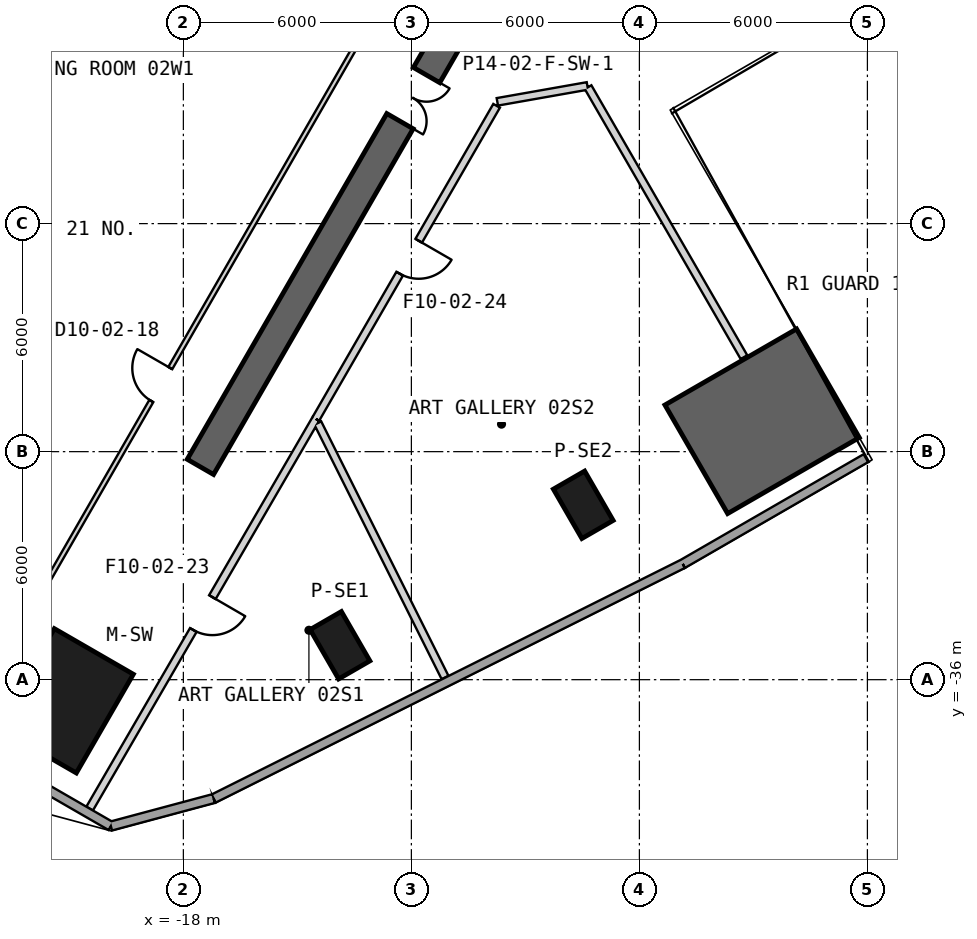
"""IFC4 building model, lengths in metres.
Left out: names, types, materials, properties, quantities, classifications, styles, units other than length and angle.
Written with IfcOpenShell. Run it as: python <this file> out.ifc"""

import sys

from ifc_helpers import new_model, si_unit, direction, frame, frame_2d, origin, origin_2d, place, context, subcontext, project, spatial, polyline, rectangle, outline, extrude, element, fill, save


model = new_model("IFC4")
c1 = context("Model", 3, precision=1e-05, world=origin(), true_north=direction((0.0, 1.0)))
c2 = subcontext(c1, "Body", "Model", "MODEL_VIEW")
j1 = project(units=[si_unit("LENGTHUNIT", "METRE"), si_unit("PLANEANGLEUNIT", "RADIAN")], contexts=[c1])
p1 = place(None, origin())
s1 = spatial("IfcSite", under=j1, at=p1, CompositionType="ELEMENT")
p2 = place(p1, origin())
s2 = spatial("IfcBuilding", under=s1, at=p2, CompositionType="ELEMENT")
p3 = place(p2, frame((0.0, 0.0, 15.5)))
s3 = spatial("IfcBuildingStorey", under=s2, at=p3, CompositionType="ELEMENT", Elevation=15.5)
p4 = place(p3, frame((-21.106, -36.556, 0.0), z_axis=(0.0, 0.0, 1.0), x_axis=(-0.5, -0.866025403784, 0.0)))
e1 = element("IfcColumn", 1, at=p4, inside=s3, PredefinedType="COLUMN", context=c2, shape_type="SweptSolid", body=[
    extrude(rectangle(XDim=3.0, YDim=2.4, at=origin_2d()), origin(), (0.0, 0.0, 1.0), 6.0),
])
for number, where, z_axis, x_axis in (
    (2, (-13.878, -35.094, 0.0), (0.0, 0.0, 1.0), (0.5, -0.866, 0.0)),
    (3, (-7.477, -31.398, 0.0), (0.0, 0.0, 1.0), (0.5, -0.866, 0.0)),
):
    element("IfcColumn", number, at=place(p3, frame(where, z_axis=z_axis, x_axis=x_axis)), inside=s3, PredefinedType="COLUMN", context=c2, shape_type="SweptSolid", body=[
        extrude(rectangle(XDim=1.5, YDim=0.95, at=origin_2d()), origin(), (0.0, 0.0, 1.0), 6.0),
    ])
p5 = place(p3, frame((-10.575, -18.316, 0.0), z_axis=(0.0, 0.0, 1.0), x_axis=(-0.499996575515, -0.866027380903, 0.0)))
e4 = element("IfcWall", 4, at=p5, inside=s3, PredefinedType="SHEAR", context=c2, shape_type="SweptSolid", body=[
    extrude(rectangle(XDim=13.954, YDim=0.8, at=frame_2d((6.977, 0.0))), origin(), (0.0, 0.0, 1.0), 6.0),
])
p6 = place(p5, frame((2.05, 0.0, 0.0)))
e5 = element("IfcOpeningElement", 5, at=p6, cuts=e4, PredefinedType="OPENING", context=c2, shape_type="SweptSolid", body=[
    extrude(rectangle(XDim=1.4, YDim=2.4, at=frame_2d((0.7, 1.2))), frame((0.0, 0.41, 0.0), z_axis=(0.0, -1.0, 0.0), x_axis=(1.0, 0.0, 0.0)), (0.0, 0.0, 1.0), 0.82),
])
p7 = place(p3, origin())
e6 = element("IfcWall", 6, at=p7, inside=s3, PredefinedType="SHEAR", context=c2, shape_type="SweptSolid", body=[
    extrude(outline(polyline([(-3.678, -31.63), (-0.214, -29.63), (-1.864, -26.772), (-5.328, -28.772), (-3.678, -31.63)])), origin(), (0.0, 0.0, 1.0), 6.0),
])
p8 = place(p3, frame((-24.56, -37.167, 0.0), z_axis=(0.0, 0.0, 1.0), x_axis=(0.866010734295, -0.500025407441, 0.0)))
e7 = element("IfcWall", 7, at=p8, inside=s3, PredefinedType="SOLIDWALL", context=c2, shape_type="SweptSolid", body=[
    extrude(rectangle(XDim=5.371, YDim=0.24, at=frame_2d((2.686, 0.0))), origin(), (0.0, 0.0, 1.0), 5.7),
])
p9 = place(p3, frame((-19.908, -39.853, 0.0), z_axis=(0.0, 0.0, 1.0), x_axis=(0.965923146675, 0.25882904535, 0.0)))
e8 = element("IfcWall", 8, at=p9, inside=s3, PredefinedType="SOLIDWALL", context=c2, shape_type="SweptSolid", body=[
    extrude(rectangle(XDim=2.801, YDim=0.24, at=frame_2d((1.4, 0.0))), origin(), (0.0, 0.0, 1.0), 5.7),
])
p10 = place(p3, frame((-17.203, -39.128, 0.0), z_axis=(0.0, 0.0, 1.0), x_axis=(0.894377655106, 0.447312653573, 0.0)))
e9 = element("IfcWall", 9, at=p10, inside=s3, PredefinedType="SOLIDWALL", context=c2, shape_type="SweptSolid", body=[
    extrude(rectangle(XDim=13.802, YDim=0.24, at=frame_2d((6.901, 0.0))), origin(), (0.0, 0.0, 1.0), 5.7),
])
p11 = place(p3, frame((-4.859, -32.954, 0.0), z_axis=(0.0, 0.0, 1.0), x_axis=(0.865999312459, 0.500045188778, 0.0)))
e10 = element("IfcWall", 10, at=p11, inside=s3, PredefinedType="SOLIDWALL", context=c2, shape_type="SweptSolid", body=[
    extrude(rectangle(XDim=5.566, YDim=0.24, at=frame_2d((2.783, 0.0))), origin(), (0.0, 0.0, 1.0), 5.7),
])
p12 = place(p3, frame((-23.881, -37.42, 0.0), z_axis=(0.0, 0.0, 1.0), x_axis=(0.49883822201, 0.866695118402, 0.0)))
e11 = element("IfcWall", 11, at=p12, inside=s3, PredefinedType="PARTITIONING", context=c2, shape_type="SweptSolid", body=[
    extrude(rectangle(XDim=21.527, YDim=0.12, at=frame_2d((10.763, 0.0))), origin(), (0.0, 0.0, 1.0), 5.7),
])
p13 = place(p12, frame((10.099, 0.0, 0.0)))
e12 = element("IfcOpeningElement", 12, at=p13, cuts=e11, PredefinedType="OPENING", context=c2, shape_type="SweptSolid", body=[
    extrude(rectangle(XDim=1.0, YDim=2.1, at=frame_2d((0.5, 1.05))), frame((0.0, 0.07, 0.0), z_axis=(0.0, -1.0, 0.0), x_axis=(1.0, 0.0, 0.0)), (0.0, 0.0, 1.0), 0.14),
])
p14 = place(p3, frame((-14.514, -29.139, 0.0), z_axis=(0.0, 0.0, 1.0), x_axis=(-0.502061989067, -0.864831636294, 0.0)))
e13 = element("IfcWall", 13, at=p14, inside=s3, PredefinedType="PARTITIONING", context=c2, shape_type="SweptSolid", body=[
    extrude(rectangle(XDim=11.855, YDim=0.2, at=frame_2d((5.928, 0.0))), origin(), (0.0, 0.0, 1.0), 5.7),
])
p15 = place(p14, frame((5.421, 0.0, 0.0)))
e14 = element("IfcOpeningElement", 14, at=p15, cuts=e13, PredefinedType="OPENING", context=c2, shape_type="SweptSolid", body=[
    extrude(rectangle(XDim=1.0, YDim=2.1, at=frame_2d((0.5, 1.05))), frame((0.0, 0.11, 0.0), z_axis=(0.0, -1.0, 0.0), x_axis=(1.0, 0.0, 0.0)), (0.0, 0.0, 1.0), 0.22),
])
p16 = place(p3, frame((-9.738, -20.796, 0.0), z_axis=(0.0, 0.0, 1.0), x_axis=(0.984780494406, 0.173802698013, 0.0)))
e15 = element("IfcWall", 15, at=p16, inside=s3, PredefinedType="PARTITIONING", context=c2, shape_type="SweptSolid", body=[
    extrude(rectangle(XDim=2.406, YDim=0.2, at=frame_2d((1.203, 0.0))), origin(), (0.0, 0.0, 1.0), 4.78),
])
p17 = place(p3, frame((-9.758, -20.901, 0.0), z_axis=(0.0, 0.0, 1.0), x_axis=(-0.499997931106, -0.866026598257, 0.0)))
e16 = element("IfcWall", 16, at=p17, inside=s3, PredefinedType="PARTITIONING", context=c2, shape_type="SweptSolid", body=[
    extrude(rectangle(XDim=9.513, YDim=0.2, at=frame_2d((4.756, 0.0))), origin(), (0.0, 0.0, 1.0), 5.7),
])
p18 = place(p17, frame((4.1, 0.0, 0.0)))
e17 = element("IfcOpeningElement", 17, at=p18, cuts=e16, PredefinedType="OPENING", context=c2, shape_type="SweptSolid", body=[
    extrude(rectangle(XDim=1.0, YDim=2.1, at=frame_2d((0.5, 1.05))), frame((0.0, 0.11, 0.0), z_axis=(0.0, -1.0, 0.0), x_axis=(1.0, 0.0, 0.0)), (0.0, 0.0, 1.0), 0.22),
])
p19 = place(p3, frame((-7.35, -20.409, 0.0), z_axis=(0.0, 0.0, 1.0), x_axis=(0.500015278874, -0.866016582343, 0.0)))
e18 = element("IfcWall", 18, at=p19, inside=s3, PredefinedType="PARTITIONING", context=c2, shape_type="SweptSolid", body=[
    extrude(rectangle(XDim=8.203, YDim=0.2, at=frame_2d((4.102, 0.0))), origin(), (0.0, 0.0, 1.0), 5.07),
])
p20 = place(p3, frame((-14.462, -29.248, 0.0), z_axis=(0.0, 0.0, 1.0), x_axis=(0.447304919826, -0.894381523009, 0.0)))
e19 = element("IfcWall", 19, at=p20, inside=s3, PredefinedType="PARTITIONING", context=c2, shape_type="SweptSolid", body=[
    extrude(rectangle(XDim=7.485, YDim=0.2, at=frame_2d((3.743, 0.0))), origin(), (0.0, 0.0, 1.0), 4.78),
])
p21 = place(p13, origin())
e20 = element("IfcDoor", 20, at=p21, inside=s3, OperationType="SINGLE_SWING_RIGHT", PredefinedType="NOTDEFINED", context=c2, shape_type="SweptSolid", body=[
    extrude(rectangle(XDim=1.0, YDim=2.1, at=frame_2d((0.5, 1.05))), frame((0.0, 0.025, 0.0), z_axis=(0.0, -1.0, 0.0), x_axis=(1.0, 0.0, 0.0)), (0.0, 0.0, 1.0), 0.05),
])
fill(e12, e20)
p22 = place(p15, origin())
e21 = element("IfcDoor", 21, at=p22, inside=s3, OperationType="SINGLE_SWING_LEFT", PredefinedType="USERDEFINED", context=c2, shape_type="SweptSolid", body=[
    extrude(rectangle(XDim=1.0, YDim=2.1, at=frame_2d((0.5, 1.05))), frame((0.0, 0.025, 0.0), z_axis=(0.0, -1.0, 0.0), x_axis=(1.0, 0.0, 0.0)), (0.0, 0.0, 1.0), 0.05),
])
fill(e14, e21)
p23 = place(p18, origin())
e22 = element("IfcDoor", 22, at=p23, inside=s3, OperationType="SINGLE_SWING_LEFT", PredefinedType="USERDEFINED", context=c2, shape_type="SweptSolid", body=[
    extrude(rectangle(XDim=1.0, YDim=2.1, at=frame_2d((0.5, 1.05))), frame((0.0, 0.025, 0.0), z_axis=(0.0, -1.0, 0.0), x_axis=(1.0, 0.0, 0.0)), (0.0, 0.0, 1.0), 0.05),
])
fill(e17, e22)
p24 = place(p6, origin())
e23 = element("IfcDoor", 23, at=p24, inside=s3, OperationType="DOUBLE_DOOR_SINGLE_SWING", PredefinedType="NOTDEFINED", context=c2, shape_type="SweptSolid", body=[
    extrude(rectangle(XDim=1.4, YDim=2.4, at=frame_2d((0.7, 1.2))), frame((0.0, 0.025, 0.0), z_axis=(0.0, -1.0, 0.0), x_axis=(1.0, 0.0, 0.0)), (0.0, 0.0, 1.0), 0.05),
])
fill(e5, e23)
save(model, sys.argv[1])
